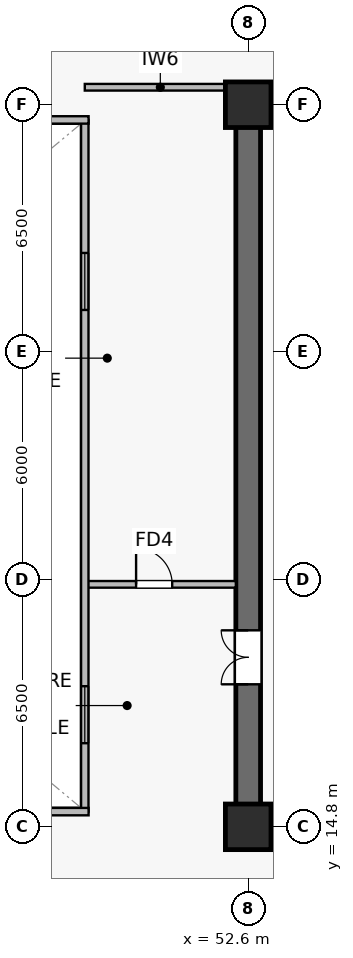
"""IFC4 building model, lengths in metres.
Left out: names, types, materials, properties, quantities, classifications, styles, units other than length and angle.
Written with IfcOpenShell. Run it as: python <this file> out.ifc"""

import sys

from ifc_helpers import new_model, si_unit, direction, frame, frame_2d, origin, origin_2d, place, context, subcontext, project, spatial, rectangle, extrude, source, transform, mapped, element, fill, save


model = new_model("IFC4")
c1 = context("Model", 3, precision=1e-05, world=origin(), true_north=direction((0.0, 1.0)))
c2 = subcontext(c1, "Body", "Model", "MODEL_VIEW")
j1 = project(units=[si_unit("LENGTHUNIT", "METRE"), si_unit("PLANEANGLEUNIT", "RADIAN")], contexts=[c1])
p1 = place(None, origin())
s1 = spatial("IfcSite", under=j1, at=p1, CompositionType="ELEMENT")
p2 = place(p1, origin())
s2 = spatial("IfcBuilding", under=s1, at=p2, CompositionType="ELEMENT")
p3 = place(p2, frame((0.0, 0.0, 158.4)))
s3 = spatial("IfcBuildingStorey", under=s2, at=p3, CompositionType="ELEMENT", Elevation=158.4)
p4 = place(p3, frame((52.275, 14.8, 0.0), z_axis=(0.0, 0.0, 1.0), x_axis=(1.0, 0.0, 0.0)))
e1 = element("IfcWall", 1, at=p4, inside=s3, PredefinedType="SHEAR", context=c2, shape_type="SweptSolid", body=[
    extrude(rectangle(XDim=15.45, YDim=0.65, at=frame_2d((7.725, 0.0))), origin(), (0.0, 0.0, 1.0), 3.79),
])
p5 = place(p3, frame((52.275, 33.8, 0.0), z_axis=(0.0, 0.0, 1.0), x_axis=(1.0, 0.0, 0.0)))
e2 = element("IfcWall", 2, at=p5, inside=s3, PredefinedType="SHEAR", context=c2, shape_type="SweptSolid", body=[
    extrude(rectangle(XDim=15.45, YDim=0.65, at=frame_2d((7.725, 0.0))), origin(), (0.0, 0.0, 1.0), 3.79),
])
p6 = place(p5, frame((6.125, 0.0, 0.0)))
e3 = element("IfcOpeningElement", 3, at=p6, cuts=e2, PredefinedType="OPENING", context=c2, shape_type="SweptSolid", body=[
    extrude(rectangle(XDim=0.95, YDim=2.15, at=frame_2d((0.475, 1.075))), frame((0.0, 0.335, 0.0), z_axis=(0.0, -1.0, 0.0), x_axis=(1.0, 0.0, 0.0)), (0.0, 0.0, 1.0), 0.67),
])
p7 = place(p5, frame((2.585, 0.0, 0.0)))
e4 = element("IfcOpeningElement", 4, at=p7, cuts=e2, PredefinedType="OPENING", context=c2, shape_type="SweptSolid", body=[
    extrude(rectangle(XDim=0.95, YDim=2.15, at=frame_2d((0.475, 1.075))), frame((0.0, 0.335, 0.0), z_axis=(0.0, -1.0, 0.0), x_axis=(1.0, 0.0, 0.0)), (0.0, 0.0, 1.0), 0.67),
])
p8 = place(p3, frame((52.6, 15.125, 0.0), z_axis=(0.0, 0.0, 1.0), x_axis=(0.0, 1.0, 0.0)))
e5 = element("IfcWall", 5, at=p8, inside=s3, PredefinedType="SHEAR", context=c2, shape_type="SweptSolid", body=[
    extrude(rectangle(XDim=18.35, YDim=0.65, at=frame_2d((9.175, 0.0))), origin(), (0.0, 0.0, 1.0), 3.79),
])
p9 = place(p8, frame((3.425, 0.0, 0.0)))
e6 = element("IfcOpeningElement", 6, at=p9, cuts=e5, PredefinedType="OPENING", context=c2, shape_type="SweptSolid", body=[
    extrude(rectangle(XDim=1.42, YDim=2.2, at=frame_2d((0.71, 1.1))), frame((0.0, 0.335, 0.0), z_axis=(0.0, -1.0, 0.0), x_axis=(1.0, 0.0, 0.0)), (0.0, 0.0, 1.0), 0.67),
])
m1 = source(origin(), c2, "Body", "SweptSolid", [
    extrude(rectangle(XDim=1.2, YDim=1.2, at=origin_2d()), origin(), (0.0, 0.0, 1.0), 4.1),
])
for number, where, z_axis, x_axis in (
    (7, (52.6, 14.8, 0.0), (0.0, 0.0, 1.0), (1.0, 0.0, 0.0)),
    (8, (52.6, 33.8, 0.0), (0.0, 0.0, 1.0), (1.0, 0.0, 0.0)),
):
    element("IfcColumn", number, at=place(p3, frame(where, z_axis=z_axis, x_axis=x_axis)), inside=s3, PredefinedType="COLUMN", context=c2, shape_type="MappedRepresentation", body=[
        mapped(m1, transform((0.0, 0.0, 0.0), scale=1.0)),
    ])
p10 = place(p3, frame((48.3, 34.26, 0.0), z_axis=(0.0, 0.0, 1.0), x_axis=(1.0, 0.0, 0.0)))
e9 = element("IfcWall", 9, at=p10, inside=s3, PredefinedType="PARTITIONING", context=c2, shape_type="SweptSolid", body=[
    extrude(rectangle(XDim=3.975, YDim=0.175, at=frame_2d((1.987, 0.0))), origin(), (0.0, 0.0, 1.0), 3.475),
])
p11 = place(p3, frame((48.3, 21.18, 0.0), z_axis=(0.0, 0.0, 1.0), x_axis=(1.0, 0.0, 0.0)))
e10 = element("IfcWall", 10, at=p11, inside=s3, PredefinedType="PARTITIONING", context=c2, shape_type="SweptSolid", body=[
    extrude(rectangle(XDim=3.975, YDim=0.175, at=frame_2d((1.987, 0.0))), origin(), (0.0, 0.0, 1.0), 3.79),
])
p12 = place(p11, frame((1.35, 0.0, 0.0)))
e11 = element("IfcOpeningElement", 11, at=p12, cuts=e10, PredefinedType="OPENING", context=c2, shape_type="SweptSolid", body=[
    extrude(rectangle(XDim=0.95, YDim=2.15, at=frame_2d((0.475, 1.075))), frame((0.0, 0.098, 0.0), z_axis=(0.0, -1.0, 0.0), x_axis=(1.0, 0.0, 0.0)), (0.0, 0.0, 1.0), 0.195),
])
p13 = place(p3, frame((48.3, 15.2, 0.0), z_axis=(0.0, 0.0, 1.0), x_axis=(0.0, 1.0, 0.0)))
e12 = element("IfcWall", 12, at=p13, inside=s3, PredefinedType="SOLIDWALL", context=c2, shape_type="SweptSolid", body=[
    extrude(rectangle(XDim=18.2, YDim=0.195, at=frame_2d((9.1, 0.0))), origin(), (0.0, 0.0, 1.0), 3.79),
])
p14 = place(p13, frame((1.8, 0.0, 0.9)))
e13 = element("IfcOpeningElement", 13, at=p14, cuts=e12, PredefinedType="OPENING", context=c2, shape_type="SweptSolid", body=[
    extrude(rectangle(XDim=1.5, YDim=1.4, at=frame_2d((0.75, 0.7))), frame((0.0, 0.107, 0.0), z_axis=(0.0, -1.0, 0.0), x_axis=(1.0, 0.0, 0.0)), (0.0, 0.0, 1.0), 0.215),
])
p15 = place(p13, frame((13.2, 0.0, 0.9)))
e14 = element("IfcOpeningElement", 14, at=p15, cuts=e12, PredefinedType="OPENING", context=c2, shape_type="SweptSolid", body=[
    extrude(rectangle(XDim=1.5, YDim=1.4, at=frame_2d((0.75, 0.7))), frame((0.0, 0.107, 0.0), z_axis=(0.0, -1.0, 0.0), x_axis=(1.0, 0.0, 0.0)), (0.0, 0.0, 1.0), 0.215),
])
for number, where, z_axis, x_axis in (
    (15, (26.4, 15.2, 0.0), (0.0, 0.0, 1.0), (1.0, 0.0, 0.0)),
    (16, (26.4, 33.4, 0.0), (0.0, 0.0, 1.0), (1.0, 0.0, 0.0)),
):
    element("IfcWall", number, at=place(p3, frame(where, z_axis=z_axis, x_axis=x_axis)), inside=s3, PredefinedType="SOLIDWALL", context=c2, shape_type="SweptSolid", body=[
        extrude(rectangle(XDim=22.0, YDim=0.195, at=frame_2d((11.0, 0.0))), origin(), (0.0, 0.0, 1.0), 3.79),
    ])
m2 = source(origin(), c2, "Body", "SweptSolid", [
    extrude(rectangle(XDim=1.5, YDim=1.4, at=frame_2d((0.75, 0.7))), frame((0.0, 0.03, 0.0), z_axis=(0.0, -1.0, 0.0), x_axis=(1.0, 0.0, 0.0)), (0.0, 0.0, 1.0), 0.06),
])
p16 = place(p14, origin())
e17 = element("IfcWindow", 17, at=p16, inside=s3, PartitioningType="SINGLE_PANEL", PredefinedType="WINDOW", context=c2, shape_type="MappedRepresentation", body=[
    mapped(m2, transform((0.0, 0.0, 0.0), scale=1.0)),
])
fill(e13, e17)
p17 = place(p15, origin())
e18 = element("IfcWindow", 18, at=p17, inside=s3, PartitioningType="SINGLE_PANEL", PredefinedType="WINDOW", context=c2, shape_type="MappedRepresentation", body=[
    mapped(m2, transform((0.0, 0.0, 0.0), scale=1.0)),
])
fill(e14, e18)
m3 = source(origin(), c2, "Body", "SweptSolid", [
    extrude(rectangle(XDim=1.42, YDim=2.2, at=frame_2d((0.71, 1.1))), frame((0.0, 0.025, 0.0), z_axis=(0.0, -1.0, 0.0), x_axis=(1.0, 0.0, 0.0)), (0.0, 0.0, 1.0), 0.05),
])
p18 = place(p9, origin())
e19 = element("IfcDoor", 19, at=p18, inside=s3, OperationType="DOUBLE_DOOR_SINGLE_SWING", PredefinedType="DOOR", context=c2, shape_type="MappedRepresentation", body=[
    mapped(m3, transform((0.0, 0.0, 0.0), scale=1.0)),
])
fill(e6, e19)
m4 = source(origin(), c2, "Body", "SweptSolid", [
    extrude(rectangle(XDim=0.95, YDim=2.15, at=frame_2d((0.475, 1.075))), frame((0.0, 0.025, 0.0), z_axis=(0.0, -1.0, 0.0), x_axis=(1.0, 0.0, 0.0)), (0.0, 0.0, 1.0), 0.05),
])
p19 = place(p12, origin())
e20 = element("IfcDoor", 20, at=p19, inside=s3, OperationType="SINGLE_SWING_LEFT", PredefinedType="DOOR", context=c2, shape_type="MappedRepresentation", body=[
    mapped(m4, transform((0.0, 0.0, 0.0), scale=1.0)),
])
fill(e11, e20)
save(model, sys.argv[1])
